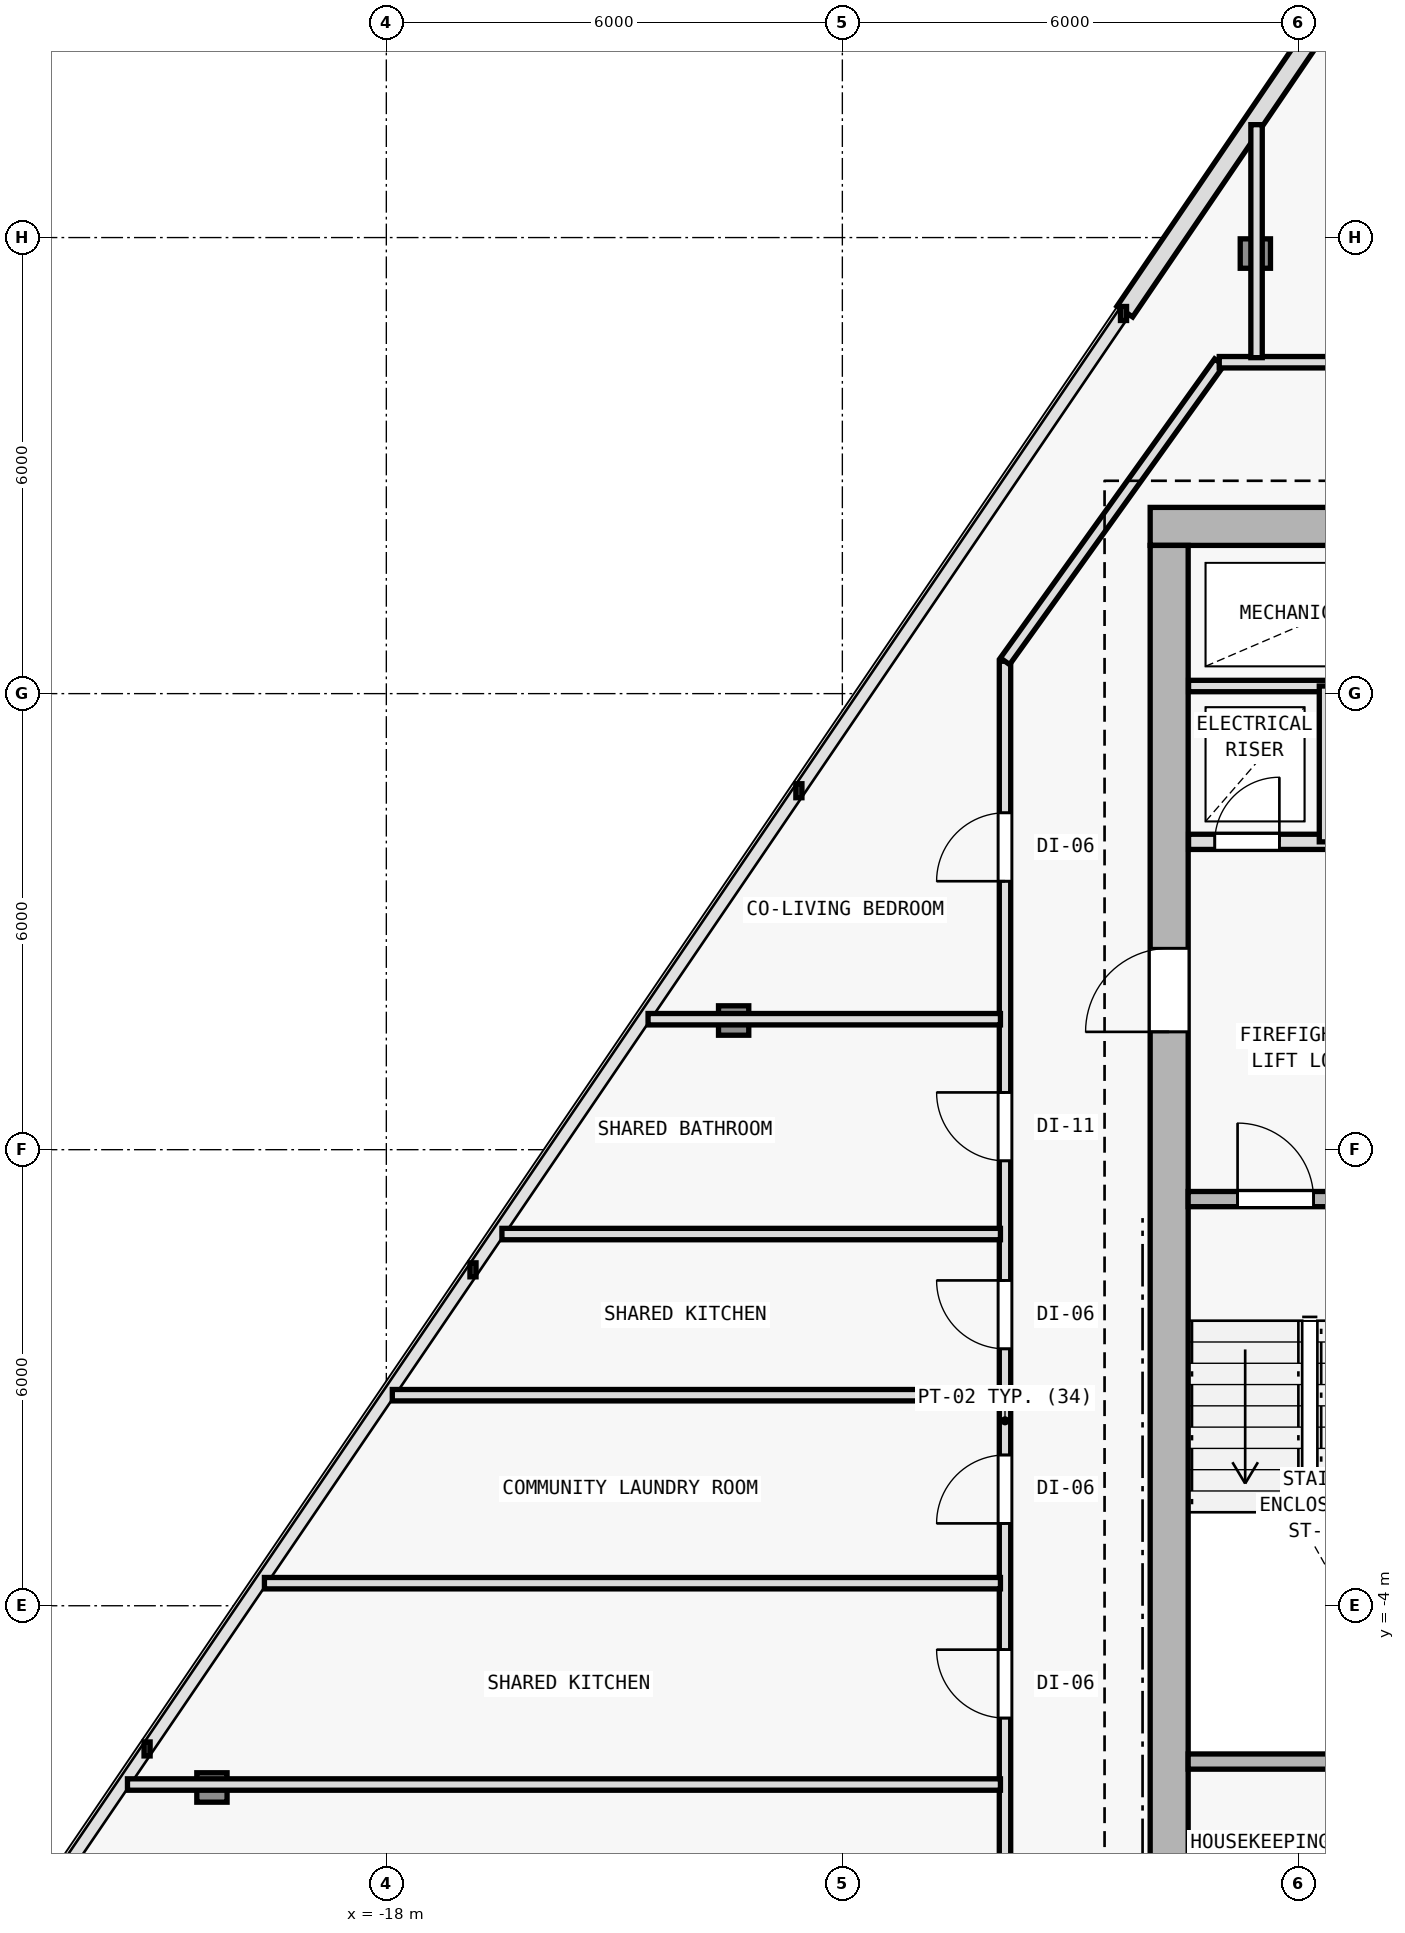
"""IFC4 building model, lengths in metres.
Left out: names, types, materials, properties, quantities, classifications, styles, units other than length and angle.
Written with IfcOpenShell. Run it as: python <this file> out.ifc"""

import sys

from ifc_helpers import new_model, si_unit, direction, frame, frame_2d, origin, origin_2d, place, context, subcontext, project, spatial, rectangle, i_section, extrude, element, fill, save


model = new_model("IFC4")
c1 = context("Model", 3, precision=1e-05, world=origin(), true_north=direction((0.0, 1.0)))
c2 = subcontext(c1, "Body", "Model", "MODEL_VIEW")
j1 = project(units=[si_unit("LENGTHUNIT", "METRE"), si_unit("PLANEANGLEUNIT", "RADIAN")], contexts=[c1])
p1 = place(None, origin())
s1 = spatial("IfcSite", under=j1, at=p1, CompositionType="ELEMENT")
p2 = place(p1, origin())
s2 = spatial("IfcBuilding", under=s1, at=p2, CompositionType="ELEMENT")
p3 = place(p2, frame((0.0, 0.0, 194.7)))
s3 = spatial("IfcBuildingStorey", under=s2, at=p3, CompositionType="ELEMENT", Elevation=194.7)
for number, where, z_axis, x_axis in (
    (1, (-7.7, 10.2, 0.0), (0.0, 0.0, 1.0), (1.0, 0.0, 0.0)),
    (2, (-7.7, 2.0, 0.0), (0.0, 0.0, 1.0), (1.0, 0.0, 0.0)),
):
    element("IfcColumn", number, at=place(p3, frame(where, z_axis=z_axis, x_axis=x_axis)), inside=s3, PredefinedType="COLUMN", context=c2, shape_type="SweptSolid", body=[
        extrude(i_section(OverallWidth=0.398, OverallDepth=0.387, WebThickness=0.013, FlangeThickness=0.022, FilletRadius=0.015, at=origin_2d()), origin(), (0.0, 0.0, 1.0), 3.6),
    ])
p4 = place(p3, frame((-6.566, 13.79, 0.006), z_axis=(0.008843163607, -0.002516900411, 0.999957730942), x_axis=(0.273743828055, 0.961802639112, 0.0)))
e3 = element("IfcColumn", 3, at=p4, inside=s3, PredefinedType="COLUMN", context=c2, shape_type="SweptSolid", body=[
    extrude(i_section(OverallWidth=0.398, OverallDepth=0.387, WebThickness=0.013, FlangeThickness=0.022, FilletRadius=0.015, at=origin_2d()), origin(), (0.0, 0.0, 1.0), 3.589),
])
p5 = place(p3, frame((-13.43, 3.699, 0.006), z_axis=(0.017071567417, 0.009521989794, 0.999808928394), x_axis=(-0.487119351792, 0.873335409284, 0.0)))
e4 = element("IfcColumn", 4, at=p5, inside=s3, PredefinedType="COLUMN", context=c2, shape_type="SweptSolid", body=[
    extrude(i_section(OverallWidth=0.398, OverallDepth=0.387, WebThickness=0.013, FlangeThickness=0.022, FilletRadius=0.015, at=origin_2d()), origin(), (0.0, 0.0, 1.0), 3.59),
])
p6 = place(p3, frame((-20.294, -6.391, 0.006), z_axis=(0.025224163578, 0.021620711639, 0.999447990843), x_axis=(-0.650791373456, 0.759256602365, 0.0)))
e5 = element("IfcColumn", 5, at=p6, inside=s3, PredefinedType="COLUMN", context=c2, shape_type="SweptSolid", body=[
    extrude(i_section(OverallWidth=0.398, OverallDepth=0.387, WebThickness=0.013, FlangeThickness=0.022, FilletRadius=0.015, at=origin_2d()), origin(), (0.0, 0.0, 1.0), 3.591),
])
p7 = place(p3, frame((-8.284, 13.026, 0.0), z_axis=(0.0, 0.0, 1.0), x_axis=(0.562468945091, 0.826818411629, 0.0)))
e6 = element("IfcWall", 6, at=p7, inside=s3, PredefinedType="SOLIDWALL", context=c2, shape_type="SweptSolid", body=[
    extrude(rectangle(XDim=10.714, YDim=0.25, at=frame_2d((5.357, 0.0))), origin(), (0.0, 0.0, 1.0), 3.35),
])
p8 = place(p7, frame((4.907, 0.0, 0.62)))
e7 = element("IfcOpeningElement", 7, at=p8, cuts=e6, PredefinedType="OPENING", context=c2, shape_type="SweptSolid", body=[
    extrude(rectangle(XDim=0.9, YDim=1.6, at=frame_2d((0.45, 0.8))), frame((0.0, 0.135, 0.0), z_axis=(0.0, -1.0, 0.0), x_axis=(1.0, 0.0, 0.0)), (0.0, 0.0, 1.0), 0.27),
])
p9 = place(p3, frame((7.95, 10.2, 0.0), z_axis=(0.0, 0.0, 1.0), x_axis=(-1.0, 0.0, 0.0)))
e8 = element("IfcWall", 8, at=p9, inside=s3, PredefinedType="SHEAR", context=c2, shape_type="SweptSolid", body=[
    extrude(rectangle(XDim=15.9, YDim=0.5, at=frame_2d((7.95, 0.0))), origin(), (0.0, 0.0, 1.0), 3.35),
])
p10 = place(p9, frame((4.4, 0.0, 0.0)))
e9 = element("IfcOpeningElement", 9, at=p10, cuts=e8, PredefinedType="OPENING", context=c2, shape_type="SweptSolid", body=[
    extrude(rectangle(XDim=1.1, YDim=2.15, at=frame_2d((0.55, 1.075))), frame((0.0, 0.26, 0.0), z_axis=(0.0, -1.0, 0.0), x_axis=(1.0, 0.0, 0.0)), (0.0, 0.0, 1.0), 0.52),
])
p11 = place(p3, frame((-7.7, -9.15, 0.0), z_axis=(0.0, 0.0, 1.0), x_axis=(0.0, 1.0, 0.0)))
e10 = element("IfcWall", 10, at=p11, inside=s3, PredefinedType="SHEAR", context=c2, shape_type="SweptSolid", body=[
    extrude(rectangle(XDim=19.1, YDim=0.5, at=frame_2d((9.55, 0.0))), origin(), (0.0, 0.0, 1.0), 3.35),
])
p12 = place(p11, frame((12.7, 0.0, 0.0)))
e11 = element("IfcOpeningElement", 11, at=p12, cuts=e10, PredefinedType="OPENING", context=c2, shape_type="SweptSolid", body=[
    extrude(rectangle(XDim=1.1, YDim=2.15, at=frame_2d((0.55, 1.075))), frame((0.0, 0.26, 0.0), z_axis=(0.0, -1.0, 0.0), x_axis=(1.0, 0.0, 0.0)), (0.0, 0.0, 1.0), 0.52),
])
p13 = place(p3, frame((-7.45, 1.35, 0.0), z_axis=(0.0, 0.0, 1.0), x_axis=(1.0, 0.0, 0.0)))
e12 = element("IfcWall", 12, at=p13, inside=s3, PredefinedType="SOLIDWALL", context=c2, shape_type="SweptSolid", body=[
    extrude(rectangle(XDim=3.4, YDim=0.2, at=frame_2d((1.7, 0.0))), origin(), (0.0, 0.0, 1.0), 3.35),
])
p14 = place(p13, frame((0.65, 0.0, 0.0)))
e13 = element("IfcOpeningElement", 13, at=p14, cuts=e12, PredefinedType="OPENING", context=c2, shape_type="SweptSolid", body=[
    extrude(rectangle(XDim=1.0, YDim=2.15, at=frame_2d((0.5, 1.075))), frame((0.0, 0.11, 0.0), z_axis=(0.0, -1.0, 0.0), x_axis=(1.0, 0.0, 0.0)), (0.0, 0.0, 1.0), 0.22),
])
p15 = place(p3, frame((-7.445, 6.05, 0.0), z_axis=(0.0, 0.0, 1.0), x_axis=(1.0, 0.0, 0.0)))
e14 = element("IfcWall", 14, at=p15, inside=s3, PredefinedType="SOLIDWALL", context=c2, shape_type="SweptSolid", body=[
    extrude(rectangle(XDim=3.595, YDim=0.2, at=frame_2d((1.797, 0.0))), origin(), (0.0, 0.0, 1.0), 3.35),
])
p16 = place(p15, frame((0.345, 0.0, 0.0)))
e15 = element("IfcOpeningElement", 15, at=p16, cuts=e14, PredefinedType="OPENING", context=c2, shape_type="SweptSolid", body=[
    extrude(rectangle(XDim=0.85, YDim=2.1, at=frame_2d((0.425, 1.05))), frame((0.0, 0.11, 0.0), z_axis=(0.0, -1.0, 0.0), x_axis=(1.0, 0.0, 0.0)), (0.0, 0.0, 1.0), 0.22),
])
p17 = place(p15, frame((2.145, 0.0, 0.0)))
e16 = element("IfcOpeningElement", 16, at=p17, cuts=e14, PredefinedType="OPENING", context=c2, shape_type="SweptSolid", body=[
    extrude(rectangle(XDim=0.85, YDim=2.1, at=frame_2d((0.425, 1.05))), frame((0.0, 0.11, 0.0), z_axis=(0.0, -1.0, 0.0), x_axis=(1.0, 0.0, 0.0)), (0.0, 0.0, 1.0), 0.22),
])
p18 = place(p3, frame((-7.445, 8.1, 0.0), z_axis=(0.0, 0.0, 1.0), x_axis=(1.0, 0.0, 0.0)))
e17 = element("IfcWall", 17, at=p18, inside=s3, PredefinedType="PARTITIONING", context=c2, shape_type="SweptSolid", body=[
    extrude(rectangle(XDim=3.595, YDim=0.15, at=frame_2d((1.797, 0.0))), origin(), (0.0, 0.0, 1.0), 3.35),
])
p19 = place(p3, frame((-5.65, 6.05, 0.0), z_axis=(0.0, 0.0, 1.0), x_axis=(0.0, 1.0, 0.0)))
e18 = element("IfcWall", 18, at=p19, inside=s3, PredefinedType="PARTITIONING", context=c2, shape_type="SweptSolid", body=[
    extrude(rectangle(XDim=2.05, YDim=0.15, at=frame_2d((1.025, 0.0))), origin(), (0.0, 0.0, 1.0), 3.35),
])
p20 = place(p3, frame((-7.45, -6.05, 0.0), z_axis=(0.0, 0.0, 1.0), x_axis=(1.0, 0.0, 0.0)))
e19 = element("IfcWall", 19, at=p20, inside=s3, PredefinedType="SOLIDWALL", context=c2, shape_type="SweptSolid", body=[
    extrude(rectangle(XDim=3.4, YDim=0.2, at=frame_2d((1.7, 0.0))), origin(), (0.0, 0.0, 1.0), 3.35),
])
p21 = place(p3, frame((-9.86, -11.56, 0.0), z_axis=(0.0, 0.0, 1.0), x_axis=(0.0, 1.0, 0.0)))
e20 = element("IfcWall", 20, at=p21, inside=s3, PredefinedType="PARTITIONING", context=c2, shape_type="SweptSolid", body=[
    extrude(rectangle(XDim=19.986, YDim=0.15, at=frame_2d((9.993, 0.0))), origin(), (0.0, 0.0, 1.0), 2.825),
])
p22 = place(p21, frame((10.94, 0.0, 0.0)))
e21 = element("IfcOpeningElement", 21, at=p22, cuts=e20, PredefinedType="OPENING", context=c2, shape_type="SweptSolid", body=[
    extrude(rectangle(XDim=0.9, YDim=2.1, at=frame_2d((0.45, 1.05))), frame((0.0, 0.085, 0.0), z_axis=(0.0, -1.0, 0.0), x_axis=(1.0, 0.0, 0.0)), (0.0, 0.0, 1.0), 0.17),
])
p23 = place(p21, frame((8.643, 0.0, 0.0)))
e22 = element("IfcOpeningElement", 22, at=p23, cuts=e20, PredefinedType="OPENING", context=c2, shape_type="SweptSolid", body=[
    extrude(rectangle(XDim=0.9, YDim=2.1, at=frame_2d((0.45, 1.05))), frame((0.0, 0.085, 0.0), z_axis=(0.0, -1.0, 0.0), x_axis=(1.0, 0.0, 0.0)), (0.0, 0.0, 1.0), 0.17),
])
p24 = place(p21, frame((6.082, 0.0, 0.0)))
e23 = element("IfcOpeningElement", 23, at=p24, cuts=e20, PredefinedType="OPENING", context=c2, shape_type="SweptSolid", body=[
    extrude(rectangle(XDim=0.9, YDim=2.1, at=frame_2d((0.45, 1.05))), frame((0.0, 0.085, 0.0), z_axis=(0.0, -1.0, 0.0), x_axis=(1.0, 0.0, 0.0)), (0.0, 0.0, 1.0), 0.17),
])
p25 = place(p21, frame((2.243, 0.0, 0.0)))
e24 = element("IfcOpeningElement", 24, at=p25, cuts=e20, PredefinedType="OPENING", context=c2, shape_type="SweptSolid", body=[
    extrude(rectangle(XDim=0.9, YDim=2.1, at=frame_2d((0.45, 1.05))), frame((0.0, 0.085, 0.0), z_axis=(0.0, -1.0, 0.0), x_axis=(1.0, 0.0, 0.0)), (0.0, 0.0, 1.0), 0.17),
])
p26 = place(p21, frame((17.092, 0.0, 0.0)))
e25 = element("IfcOpeningElement", 25, at=p26, cuts=e20, PredefinedType="OPENING", context=c2, shape_type="SweptSolid", body=[
    extrude(rectangle(XDim=0.9, YDim=2.1, at=frame_2d((0.45, 1.05))), frame((0.0, 0.085, 0.0), z_axis=(0.0, -1.0, 0.0), x_axis=(1.0, 0.0, 0.0)), (0.0, 0.0, 1.0), 0.17),
])
p27 = place(p21, frame((13.413, 0.0, 0.0)))
e26 = element("IfcOpeningElement", 26, at=p27, cuts=e20, PredefinedType="OPENING", context=c2, shape_type="SweptSolid", body=[
    extrude(rectangle(XDim=0.9, YDim=2.1, at=frame_2d((0.45, 1.05))), frame((0.0, 0.085, 0.0), z_axis=(0.0, -1.0, 0.0), x_axis=(1.0, 0.0, 0.0)), (0.0, 0.0, 1.0), 0.17),
])
p28 = place(p3, frame((-9.86, 8.426, 0.0), z_axis=(0.0, 0.0, 1.0), x_axis=(0.582449511476, 0.812866881218, 0.0)))
e27 = element("IfcWall", 27, at=p28, inside=s3, PredefinedType="PARTITIONING", context=c2, shape_type="SweptSolid", body=[
    extrude(rectangle(XDim=4.84, YDim=0.15, at=frame_2d((2.42, 0.0))), origin(), (0.0, 0.0, 1.0), 2.935),
])
p29 = place(p3, frame((-7.041, 12.36, 0.0), z_axis=(0.0, 0.0, 1.0), x_axis=(1.0, 0.0, 0.0)))
e28 = element("IfcWall", 28, at=p29, inside=s3, PredefinedType="PARTITIONING", context=c2, shape_type="SweptSolid", body=[
    extrude(rectangle(XDim=14.064, YDim=0.15, at=frame_2d((7.032, 0.0))), origin(), (0.0, 0.0, 1.0), 3.005),
])
p30 = place(p29, frame((6.738, 0.0, 0.0)))
e29 = element("IfcOpeningElement", 29, at=p30, cuts=e28, PredefinedType="OPENING", context=c2, shape_type="SweptSolid", body=[
    extrude(rectangle(XDim=0.9, YDim=2.1, at=frame_2d((0.45, 1.05))), frame((0.0, 0.085, 0.0), z_axis=(0.0, -1.0, 0.0), x_axis=(1.0, 0.0, 0.0)), (0.0, 0.0, 1.0), 0.17),
])
p31 = place(p3, frame((-6.55, 12.42, 0.0), z_axis=(0.0, 0.0, 1.0), x_axis=(0.0, 1.0, 0.0)))
e30 = element("IfcWall", 30, at=p31, inside=s3, PredefinedType="PARTITIONING", context=c2, shape_type="SweptSolid", body=[
    extrude(rectangle(XDim=3.065, YDim=0.15, at=frame_2d((1.533, 0.0))), origin(), (0.0, 0.0, 1.0), 2.935),
])
p32 = place(p3, frame((-9.92, 3.717, 0.0), z_axis=(0.0, 0.0, 1.0), x_axis=(-1.0, 0.0, 0.0)))
e31 = element("IfcWall", 31, at=p32, inside=s3, PredefinedType="PARTITIONING", context=c2, shape_type="SweptSolid", body=[
    extrude(rectangle(XDim=4.636, YDim=0.15, at=frame_2d((2.318, 0.0))), origin(), (0.0, 0.0, 1.0), 2.935),
])
p33 = place(p3, frame((-9.92, -6.352, 0.0), z_axis=(0.0, 0.0, 1.0), x_axis=(-1.0, 0.0, 0.0)))
e32 = element("IfcWall", 32, at=p33, inside=s3, PredefinedType="PARTITIONING", context=c2, shape_type="SweptSolid", body=[
    extrude(rectangle(XDim=11.486, YDim=0.15, at=frame_2d((5.743, 0.0))), origin(), (0.0, 0.0, 1.0), 2.825),
])
p34 = place(p3, frame((-9.92, -1.23, 0.0), z_axis=(0.0, 0.0, 1.0), x_axis=(-1.0, 0.0, 0.0)))
e33 = element("IfcWall", 33, at=p34, inside=s3, PredefinedType="PARTITIONING", context=c2, shape_type="SweptSolid", body=[
    extrude(rectangle(XDim=8.001, YDim=0.15, at=frame_2d((4.001, 0.0))), origin(), (0.0, 0.0, 1.0), 2.935),
])
p35 = place(p3, frame((-9.92, -3.703, 0.0), z_axis=(0.0, 0.0, 1.0), x_axis=(-0.999999999682, 2.5211143e-05, 0.0)))
e34 = element("IfcWall", 34, at=p35, inside=s3, PredefinedType="PARTITIONING", context=c2, shape_type="SweptSolid", body=[
    extrude(rectangle(XDim=9.684, YDim=0.15, at=frame_2d((4.842, 0.0))), origin(), (0.0, 0.0, 1.0), 2.935),
])
p36 = place(p3, frame((-9.92, 0.89, 0.0), z_axis=(0.0, 0.0, 1.0), x_axis=(-1.0, 0.0, 0.0)))
e35 = element("IfcWall", 35, at=p36, inside=s3, PredefinedType="PARTITIONING", context=c2, shape_type="SweptSolid", body=[
    extrude(rectangle(XDim=6.559, YDim=0.15, at=frame_2d((3.28, 0.0))), origin(), (0.0, 0.0, 1.0), 2.935),
])
p37 = place(p12, origin())
e36 = element("IfcDoor", 36, at=p37, inside=s3, OperationType="SINGLE_SWING_LEFT", PredefinedType="DOOR", context=c2, shape_type="SweptSolid", body=[
    extrude(rectangle(XDim=1.1, YDim=2.15, at=frame_2d((0.55, 1.075))), frame((0.0, 0.025, 0.0), z_axis=(0.0, -1.0, 0.0), x_axis=(1.0, 0.0, 0.0)), (0.0, 0.0, 1.0), 0.05),
])
fill(e11, e36)
p38 = place(p14, origin())
e37 = element("IfcDoor", 37, at=p38, inside=s3, OperationType="SINGLE_SWING_LEFT", PredefinedType="DOOR", context=c2, shape_type="SweptSolid", body=[
    extrude(rectangle(XDim=1.0, YDim=2.15, at=frame_2d((0.5, 1.075))), frame((0.0, 0.025, 0.0), z_axis=(0.0, -1.0, 0.0), x_axis=(1.0, 0.0, 0.0)), (0.0, 0.0, 1.0), 0.05),
])
fill(e13, e37)
p39 = place(p16, origin())
e38 = element("IfcDoor", 38, at=p39, inside=s3, OperationType="SINGLE_SWING_RIGHT", PredefinedType="DOOR", context=c2, shape_type="SweptSolid", body=[
    extrude(rectangle(XDim=0.85, YDim=2.1, at=frame_2d((0.425, 1.05))), frame((0.0, 0.025, 0.0), z_axis=(0.0, -1.0, 0.0), x_axis=(1.0, 0.0, 0.0)), (0.0, 0.0, 1.0), 0.05),
])
fill(e15, e38)
p40 = place(p22, origin())
e39 = element("IfcDoor", 39, at=p40, inside=s3, OperationType="SINGLE_SWING_RIGHT", PredefinedType="DOOR", context=c2, shape_type="SweptSolid", body=[
    extrude(rectangle(XDim=0.9, YDim=2.1, at=frame_2d((0.45, 1.05))), frame((0.0, 0.025, 0.0), z_axis=(0.0, -1.0, 0.0), x_axis=(1.0, 0.0, 0.0)), (0.0, 0.0, 1.0), 0.05),
])
fill(e21, e39)
p41 = place(p23, origin())
e40 = element("IfcDoor", 40, at=p41, inside=s3, OperationType="SINGLE_SWING_LEFT", PredefinedType="DOOR", context=c2, shape_type="SweptSolid", body=[
    extrude(rectangle(XDim=0.9, YDim=2.1, at=frame_2d((0.45, 1.05))), frame((0.0, 0.025, 0.0), z_axis=(0.0, -1.0, 0.0), x_axis=(1.0, 0.0, 0.0)), (0.0, 0.0, 1.0), 0.05),
])
fill(e22, e40)
p42 = place(p24, origin())
e41 = element("IfcDoor", 41, at=p42, inside=s3, OperationType="SINGLE_SWING_RIGHT", PredefinedType="DOOR", context=c2, shape_type="SweptSolid", body=[
    extrude(rectangle(XDim=0.9, YDim=2.1, at=frame_2d((0.45, 1.05))), frame((0.0, 0.025, 0.0), z_axis=(0.0, -1.0, 0.0), x_axis=(1.0, 0.0, 0.0)), (0.0, 0.0, 1.0), 0.05),
])
fill(e23, e41)
p43 = place(p26, origin())
e42 = element("IfcDoor", 42, at=p43, inside=s3, OperationType="SINGLE_SWING_LEFT", PredefinedType="DOOR", context=c2, shape_type="SweptSolid", body=[
    extrude(rectangle(XDim=0.9, YDim=2.1, at=frame_2d((0.45, 1.05))), frame((0.0, 0.025, 0.0), z_axis=(0.0, -1.0, 0.0), x_axis=(1.0, 0.0, 0.0)), (0.0, 0.0, 1.0), 0.05),
])
fill(e25, e42)
p44 = place(p27, origin())
e43 = element("IfcDoor", 43, at=p44, inside=s3, OperationType="SINGLE_SWING_RIGHT", PredefinedType="DOOR", context=c2, shape_type="SweptSolid", body=[
    extrude(rectangle(XDim=0.9, YDim=2.1, at=frame_2d((0.45, 1.05))), frame((0.0, 0.025, 0.0), z_axis=(0.0, -1.0, 0.0), x_axis=(1.0, 0.0, 0.0)), (0.0, 0.0, 1.0), 0.05),
])
fill(e26, e43)
save(model, sys.argv[1])
